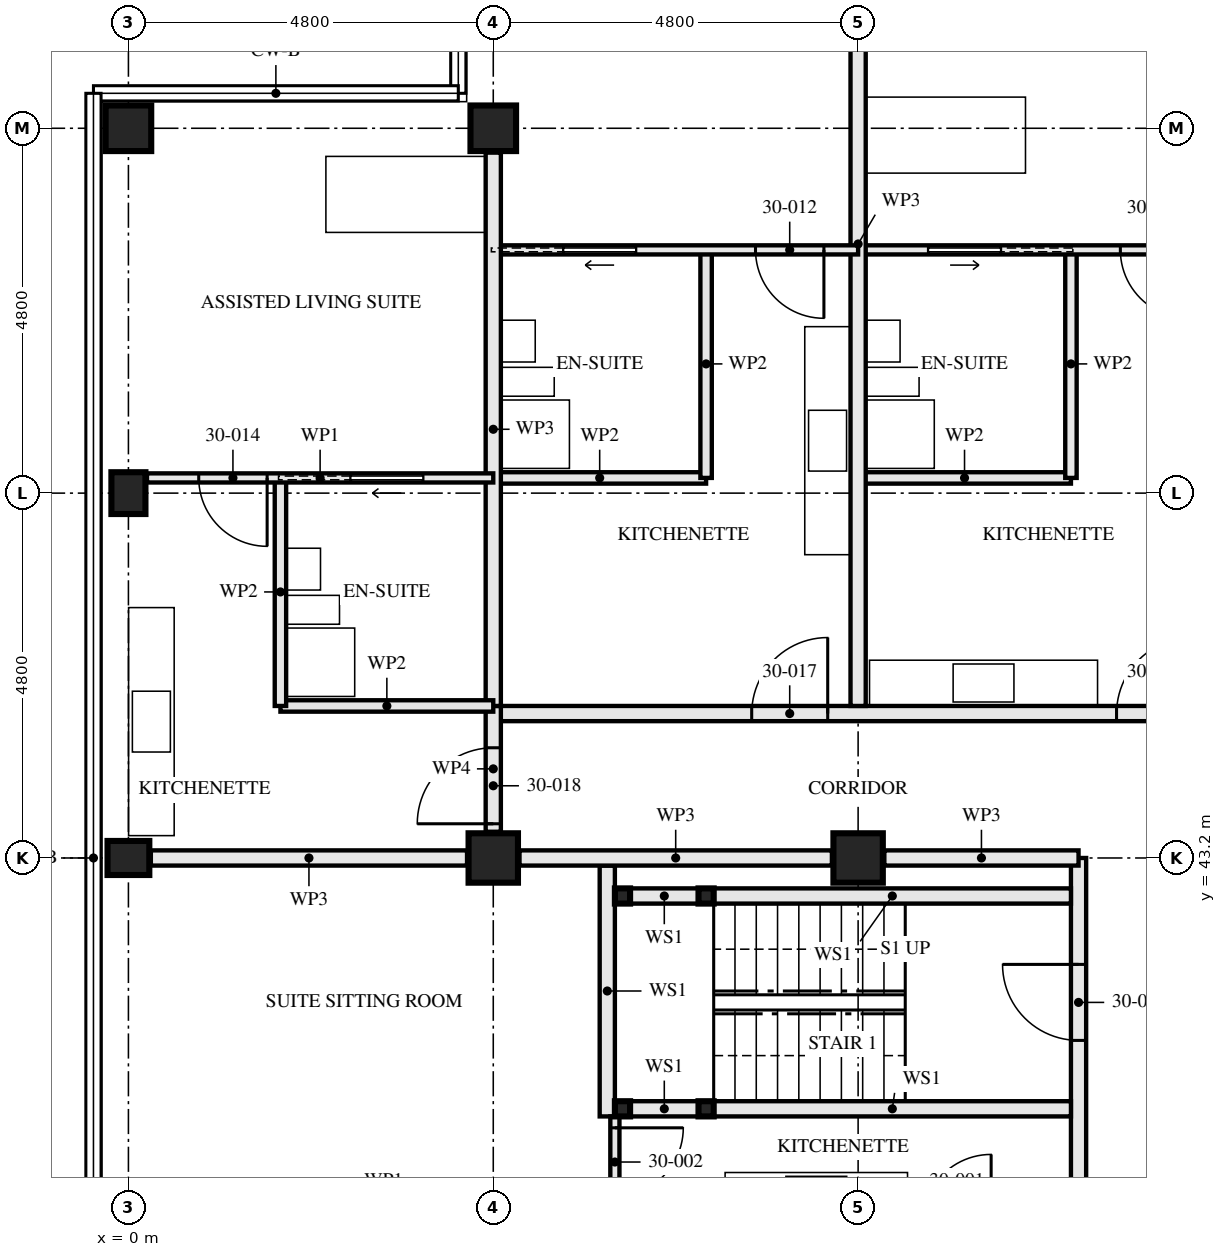
"""IFC4 building model, lengths in metres.
Left out: names, types, materials, properties, quantities, classifications, styles, units other than length and angle.
Written with IfcOpenShell. Run it as: python <this file> out.ifc"""

import sys

from ifc_helpers import new_model, si_unit, direction, frame, frame_2d, origin, origin_2d, place, context, subcontext, project, spatial, rectangle, hollow_rectangle, i_section, extrude, element, fill, save


model = new_model("IFC4")
c1 = context("Model", 3, precision=1e-05, world=origin(), true_north=direction((0.0, 1.0)))
c2 = subcontext(c1, "Body", "Model", "MODEL_VIEW")
j1 = project(units=[si_unit("LENGTHUNIT", "METRE"), si_unit("PLANEANGLEUNIT", "RADIAN")], contexts=[c1])
p1 = place(None, origin())
s1 = spatial("IfcSite", under=j1, at=p1, CompositionType="ELEMENT")
p2 = place(p1, origin())
s2 = spatial("IfcBuilding", under=s1, at=p2, CompositionType="ELEMENT")
p3 = place(p2, frame((0.0, 0.0, 112.0)))
s3 = spatial("IfcBuildingStorey", under=s2, at=p3, CompositionType="ELEMENT", Elevation=112.0)
for number, where, z_axis, x_axis in (
    (1, (0.0, 43.2, 0.0), (0.0, 0.0, 1.0), (0.0, 1.0, 0.0)),
    (2, (0.0, 48.0, 0.0), (0.0, 0.0, 1.0), (1.0, 0.0, 0.0)),
):
    element("IfcColumn", number, at=place(p3, frame(where, z_axis=z_axis, x_axis=x_axis)), inside=s3, PredefinedType="COLUMN", context=c2, shape_type="SweptSolid", body=[
        extrude(i_section(OverallWidth=0.448, OverallDepth=0.55, WebThickness=0.072, FlangeThickness=0.115, FilletRadius=0.015, at=origin_2d()), origin(), (0.0, 0.0, 1.0), 3.5),
    ])
p4 = place(p3, frame((0.0, 52.8, 0.0), z_axis=(0.0, 0.0, 1.0), x_axis=(0.0, 1.0, 0.0)))
e3 = element("IfcColumn", 3, at=p4, inside=s3, PredefinedType="COLUMN", context=c2, shape_type="SweptSolid", body=[
    extrude(hollow_rectangle(XDim=0.6, YDim=0.6, WallThickness=0.05, at=origin_2d()), origin(), (0.0, 0.0, 1.0), 3.5),
])
p5 = place(p3, frame((4.8, 43.2, 0.0), z_axis=(0.0, 0.0, 1.0), x_axis=(0.0, 1.0, 0.0)))
e4 = element("IfcColumn", 4, at=p5, inside=s3, PredefinedType="COLUMN", context=c2, shape_type="SweptSolid", body=[
    extrude(hollow_rectangle(XDim=0.65, YDim=0.65, WallThickness=0.05, at=origin_2d()), origin(), (0.0, 0.0, 1.0), 3.5),
])
p6 = place(p3, frame((4.8, 52.8, 0.0), z_axis=(0.0, 0.0, 1.0), x_axis=(0.0, 1.0, 0.0)))
e5 = element("IfcColumn", 5, at=p6, inside=s3, PredefinedType="COLUMN", context=c2, shape_type="SweptSolid", body=[
    extrude(hollow_rectangle(XDim=0.6, YDim=0.6, WallThickness=0.05, at=origin_2d()), origin(), (0.0, 0.0, 1.0), 3.5),
])
p7 = place(p3, frame((9.6, 43.2, 0.0), z_axis=(0.0, 0.0, 1.0), x_axis=(0.0, 1.0, 0.0)))
e6 = element("IfcColumn", 6, at=p7, inside=s3, PredefinedType="COLUMN", context=c2, shape_type="SweptSolid", body=[
    extrude(hollow_rectangle(XDim=0.65, YDim=0.65, WallThickness=0.05, at=origin_2d()), origin(), (0.0, 0.0, 1.0), 3.5),
])
for number, where, z_axis, x_axis in (
    (7, (6.5, 42.7, 0.0), (0.0, 0.0, 1.0), (1.0, 0.0, 0.0)),
    (8, (6.5, 39.9, 0.0), (0.0, 0.0, 1.0), (1.0, 0.0, 0.0)),
    (9, (7.6, 42.7, 0.0), (0.0, 0.0, 1.0), (1.0, 0.0, 0.0)),
    (10, (7.6, 39.9, 0.0), (0.0, 0.0, 1.0), (1.0, 0.0, 0.0)),
):
    element("IfcColumn", number, at=place(p3, frame(where, z_axis=z_axis, x_axis=x_axis)), inside=s3, PredefinedType="COLUMN", context=c2, shape_type="SweptSolid", body=[
        extrude(hollow_rectangle(XDim=0.2, YDim=0.2, WallThickness=0.008, at=origin_2d()), origin(), (0.0, 0.0, 1.0), 3.33),
    ])
p8 = place(p3, frame((6.6, 42.7, 0.0), z_axis=(0.0, 0.0, 1.0), x_axis=(1.0, 0.0, 0.0)))
e11 = element("IfcWall", 11, at=p8, inside=s3, PredefinedType="SOLIDWALL", context=c2, shape_type="SweptSolid", body=[
    extrude(rectangle(XDim=0.9, YDim=0.2, at=frame_2d((0.45, 0.0))), origin(), (0.0, 0.0, 1.0), 2.99),
])
p9 = place(p3, frame((7.7, 42.7, 0.0), z_axis=(0.0, 0.0, 1.0), x_axis=(1.0, 0.0, 0.0)))
e12 = element("IfcWall", 12, at=p9, inside=s3, PredefinedType="SOLIDWALL", context=c2, shape_type="SweptSolid", body=[
    extrude(rectangle(XDim=4.7, YDim=0.2, at=frame_2d((2.35, 0.0))), origin(), (0.0, 0.0, 1.0), 2.99),
])
p10 = place(p3, frame((6.6, 39.9, 0.0), z_axis=(0.0, 0.0, 1.0), x_axis=(1.0, 0.0, 0.0)))
e13 = element("IfcWall", 13, at=p10, inside=s3, PredefinedType="SOLIDWALL", context=c2, shape_type="SweptSolid", body=[
    extrude(rectangle(XDim=0.9, YDim=0.2, at=frame_2d((0.45, 0.0))), origin(), (0.0, 0.0, 1.0), 2.99),
])
p11 = place(p3, frame((7.7, 39.9, 0.0), z_axis=(0.0, 0.0, 1.0), x_axis=(1.0, 0.0, 0.0)))
e14 = element("IfcWall", 14, at=p11, inside=s3, PredefinedType="SOLIDWALL", context=c2, shape_type="SweptSolid", body=[
    extrude(rectangle(XDim=4.7, YDim=0.2, at=frame_2d((2.35, 0.0))), origin(), (0.0, 0.0, 1.0), 2.99),
])
p12 = place(p3, frame((6.3, 43.1, 0.0), z_axis=(0.0, 0.0, 1.0), x_axis=(0.0, -1.0, 0.0)))
e15 = element("IfcWall", 15, at=p12, inside=s3, PredefinedType="SOLIDWALL", context=c2, shape_type="SweptSolid", body=[
    extrude(rectangle(XDim=3.3, YDim=0.2, at=frame_2d((1.65, 0.0))), origin(), (0.0, 0.0, 1.0), 3.33),
])
p13 = place(p3, frame((6.4, 39.8, 0.0), z_axis=(0.0, 0.0, 1.0), x_axis=(0.0, -1.0, 0.0)))
e16 = element("IfcWall", 16, at=p13, inside=s3, PredefinedType="PARTITIONING", context=c2, shape_type="SweptSolid", body=[
    extrude(rectangle(XDim=1.4, YDim=0.12, at=frame_2d((0.7, 0.0))), origin(), (0.0, 0.0, 1.0), 3.33),
])
p14 = place(p13, frame((0.15, 0.0, 0.0)))
e17 = element("IfcOpeningElement", 17, at=p14, cuts=e16, PredefinedType="OPENING", context=c2, shape_type="SweptSolid", body=[
    extrude(rectangle(XDim=0.9, YDim=2.1, at=frame_2d((0.45, 1.05))), frame((0.0, 0.071, 0.0), z_axis=(0.0, -1.0, 0.0), x_axis=(1.0, 0.0, 0.0)), (0.0, 0.0, 1.0), 0.141),
])
p15 = place(p3, frame((12.5, 43.2, 0.0), z_axis=(0.0, 0.0, 1.0), x_axis=(0.0, -1.0, 0.0)))
e18 = element("IfcWall", 18, at=p15, inside=s3, PredefinedType="PARTITIONING", context=c2, shape_type="SweptSolid", body=[
    extrude(rectangle(XDim=14.84, YDim=0.2, at=frame_2d((7.42, 0.0))), origin(), (0.0, 0.0, 1.0), 2.32),
])
p16 = place(p15, frame((1.4, 0.0, 0.0)))
e19 = element("IfcOpeningElement", 19, at=p16, cuts=e18, PredefinedType="OPENING", context=c2, shape_type="SweptSolid", body=[
    extrude(rectangle(XDim=1.0, YDim=2.1, at=frame_2d((0.5, 1.05))), frame((0.0, 0.111, 0.0), z_axis=(0.0, -1.0, 0.0), x_axis=(1.0, 0.0, 0.0)), (0.0, 0.0, 1.0), 0.221),
])
p17 = place(p15, frame((5.2, 0.0, 0.0)))
e20 = element("IfcOpeningElement", 20, at=p17, cuts=e18, PredefinedType="OPENING", context=c2, shape_type="SweptSolid", body=[
    extrude(rectangle(XDim=1.0, YDim=2.1, at=frame_2d((0.5, 1.05))), frame((0.0, 0.111, 0.0), z_axis=(0.0, -1.0, 0.0), x_axis=(1.0, 0.0, 0.0)), (0.0, 0.0, 1.0), 0.221),
])
p18 = place(p15, frame((13.0, 0.0, 0.0)))
e21 = element("IfcOpeningElement", 21, at=p18, cuts=e18, PredefinedType="OPENING", context=c2, shape_type="SweptSolid", body=[
    extrude(rectangle(XDim=1.0, YDim=2.1, at=frame_2d((0.5, 1.05))), frame((0.0, 0.111, 0.0), z_axis=(0.0, -1.0, 0.0), x_axis=(1.0, 0.0, 0.0)), (0.0, 0.0, 1.0), 0.221),
])
p19 = place(p3, frame((12.4, 51.2, 0.0), z_axis=(0.0, 0.0, 1.0), x_axis=(0.0, -1.0, 0.0)))
e22 = element("IfcWall", 22, at=p19, inside=s3, PredefinedType="PARTITIONING", context=c2, shape_type="SweptSolid", body=[
    extrude(rectangle(XDim=3.0, YDim=0.15, at=frame_2d((1.5, 0.0))), origin(), (0.0, 0.0, 1.0), 3.33),
])
p20 = place(p3, frame((12.4, 48.2, 0.0), z_axis=(0.0, 0.0, 1.0), x_axis=(-1.0, 0.0, 0.0)))
e23 = element("IfcWall", 23, at=p20, inside=s3, PredefinedType="PARTITIONING", context=c2, shape_type="SweptSolid", body=[
    extrude(rectangle(XDim=2.8, YDim=0.15, at=frame_2d((1.4, 0.0))), origin(), (0.0, 0.0, 1.0), 3.33),
])
p21 = place(p3, frame((14.4, 51.2, 0.0), z_axis=(0.0, 0.0, 1.0), x_axis=(-1.0, 0.0, 0.0)))
e24 = element("IfcWall", 24, at=p21, inside=s3, PredefinedType="PARTITIONING", context=c2, shape_type="SweptSolid", body=[
    extrude(rectangle(XDim=4.8, YDim=0.12, at=frame_2d((2.4, 0.0))), origin(), (0.0, 0.0, 1.0), 3.33),
])
p22 = place(p21, frame((0.45, 0.0, 0.0)))
e25 = element("IfcOpeningElement", 25, at=p22, cuts=e24, PredefinedType="OPENING", context=c2, shape_type="SweptSolid", body=[
    extrude(rectangle(XDim=0.9, YDim=2.1, at=frame_2d((0.45, 1.05))), frame((0.0, 0.071, 0.0), z_axis=(0.0, -1.0, 0.0), x_axis=(1.0, 0.0, 0.0)), (0.0, 0.0, 1.0), 0.141),
])
p23 = place(p21, frame((2.925, 0.0, 0.0)))
e26 = element("IfcOpeningElement", 26, at=p23, cuts=e24, PredefinedType="OPENING", context=c2, shape_type="SweptSolid", body=[
    extrude(rectangle(XDim=0.95, YDim=2.1, at=frame_2d((0.475, 1.05))), frame((0.0, 0.071, 0.0), z_axis=(0.0, -1.0, 0.0), x_axis=(1.0, 0.0, 0.0)), (0.0, 0.0, 1.0), 0.141),
])
p24 = place(p3, frame((9.6, 57.356, 0.0), z_axis=(0.0, 0.0, 1.0), x_axis=(0.0, -1.0, 0.0)))
e27 = element("IfcWall", 27, at=p24, inside=s3, PredefinedType="PARTITIONING", context=c2, shape_type="SweptSolid", body=[
    extrude(rectangle(XDim=12.156, YDim=0.2, at=frame_2d((6.078, 0.0))), origin(), (0.0, 0.0, 1.0), 2.55),
])
p25 = place(p3, frame((7.6, 51.2, 0.0), z_axis=(0.0, 0.0, 1.0), x_axis=(0.0, -1.0, 0.0)))
e28 = element("IfcWall", 28, at=p25, inside=s3, PredefinedType="PARTITIONING", context=c2, shape_type="SweptSolid", body=[
    extrude(rectangle(XDim=3.0, YDim=0.15, at=frame_2d((1.5, 0.0))), origin(), (0.0, 0.0, 1.0), 3.33),
])
p26 = place(p3, frame((7.6, 48.2, 0.0), z_axis=(0.0, 0.0, 1.0), x_axis=(-1.0, 0.0, 0.0)))
e29 = element("IfcWall", 29, at=p26, inside=s3, PredefinedType="PARTITIONING", context=c2, shape_type="SweptSolid", body=[
    extrude(rectangle(XDim=2.8, YDim=0.15, at=frame_2d((1.4, 0.0))), origin(), (0.0, 0.0, 1.0), 3.33),
])
p27 = place(p3, frame((9.6, 51.2, 0.0), z_axis=(0.0, 0.0, 1.0), x_axis=(-1.0, 0.0, 0.0)))
e30 = element("IfcWall", 30, at=p27, inside=s3, PredefinedType="PARTITIONING", context=c2, shape_type="SweptSolid", body=[
    extrude(rectangle(XDim=4.8, YDim=0.12, at=frame_2d((2.4, 0.0))), origin(), (0.0, 0.0, 1.0), 3.33),
])
p28 = place(p27, frame((0.45, 0.0, 0.0)))
e31 = element("IfcOpeningElement", 31, at=p28, cuts=e30, PredefinedType="OPENING", context=c2, shape_type="SweptSolid", body=[
    extrude(rectangle(XDim=0.9, YDim=2.1, at=frame_2d((0.45, 1.05))), frame((0.0, 0.071, 0.0), z_axis=(0.0, -1.0, 0.0), x_axis=(1.0, 0.0, 0.0)), (0.0, 0.0, 1.0), 0.141),
])
p29 = place(p27, frame((2.925, 0.0, 0.0)))
e32 = element("IfcOpeningElement", 32, at=p29, cuts=e30, PredefinedType="OPENING", context=c2, shape_type="SweptSolid", body=[
    extrude(rectangle(XDim=0.95, YDim=2.1, at=frame_2d((0.475, 1.05))), frame((0.0, 0.071, 0.0), z_axis=(0.0, -1.0, 0.0), x_axis=(1.0, 0.0, 0.0)), (0.0, 0.0, 1.0), 0.141),
])
p30 = place(p3, frame((4.8, 52.48, 0.0), z_axis=(0.0, 0.0, 1.0), x_axis=(0.0, -1.0, 0.0)))
e33 = element("IfcWall", 33, at=p30, inside=s3, PredefinedType="PARTITIONING", context=c2, shape_type="SweptSolid", body=[
    extrude(rectangle(XDim=7.28, YDim=0.2, at=frame_2d((3.64, 0.0))), origin(), (0.0, 0.0, 1.0), 2.55),
])
p31 = place(p3, frame((2.0, 48.2, 0.0), z_axis=(0.0, 0.0, 1.0), x_axis=(0.0, -1.0, 0.0)))
e34 = element("IfcWall", 34, at=p31, inside=s3, PredefinedType="PARTITIONING", context=c2, shape_type="SweptSolid", body=[
    extrude(rectangle(XDim=3.0, YDim=0.15, at=frame_2d((1.5, 0.0))), origin(), (0.0, 0.0, 1.0), 2.55),
])
p32 = place(p3, frame((4.8, 45.2, 0.0), z_axis=(0.0, 0.0, 1.0), x_axis=(-1.0, 0.0, 0.0)))
e35 = element("IfcWall", 35, at=p32, inside=s3, PredefinedType="PARTITIONING", context=c2, shape_type="SweptSolid", body=[
    extrude(rectangle(XDim=2.8, YDim=0.15, at=frame_2d((1.4, 0.0))), origin(), (0.0, 0.0, 1.0), 3.33),
])
p33 = place(p3, frame((4.8, 48.2, 0.0), z_axis=(0.0, 0.0, 1.0), x_axis=(-1.0, 0.0, 0.0)))
e36 = element("IfcWall", 36, at=p33, inside=s3, PredefinedType="PARTITIONING", context=c2, shape_type="SweptSolid", body=[
    extrude(rectangle(XDim=4.556, YDim=0.12, at=frame_2d((2.278, 0.0))), origin(), (0.0, 0.0, 1.0), 3.33),
])
p34 = place(p33, frame((2.975, 0.0, 0.0)))
e37 = element("IfcOpeningElement", 37, at=p34, cuts=e36, PredefinedType="OPENING", context=c2, shape_type="SweptSolid", body=[
    extrude(rectangle(XDim=0.9, YDim=2.1, at=frame_2d((0.45, 1.05))), frame((0.0, 0.071, 0.0), z_axis=(0.0, -1.0, 0.0), x_axis=(1.0, 0.0, 0.0)), (0.0, 0.0, 1.0), 0.141),
])
p35 = place(p33, frame((0.925, 0.0, 0.0)))
e38 = element("IfcOpeningElement", 38, at=p35, cuts=e36, PredefinedType="OPENING", context=c2, shape_type="SweptSolid", body=[
    extrude(rectangle(XDim=0.95, YDim=2.1, at=frame_2d((0.475, 1.05))), frame((0.0, 0.071, 0.0), z_axis=(0.0, -1.0, 0.0), x_axis=(1.0, 0.0, 0.0)), (0.0, 0.0, 1.0), 0.141),
])
p36 = place(p3, frame((14.4, 45.1, 0.0), z_axis=(0.0, 0.0, 1.0), x_axis=(-1.0, 0.0, 0.0)))
e39 = element("IfcWall", 39, at=p36, inside=s3, PredefinedType="PARTITIONING", context=c2, shape_type="SweptSolid", body=[
    extrude(rectangle(XDim=9.6, YDim=0.2, at=frame_2d((4.8, 0.0))), origin(), (0.0, 0.0, 1.0), 3.33),
])
p37 = place(p36, frame((0.4, 0.0, 0.0)))
e40 = element("IfcOpeningElement", 40, at=p37, cuts=e39, PredefinedType="OPENING", context=c2, shape_type="SweptSolid", body=[
    extrude(rectangle(XDim=1.0, YDim=2.1, at=frame_2d((0.5, 1.05))), frame((0.0, 0.111, 0.0), z_axis=(0.0, -1.0, 0.0), x_axis=(1.0, 0.0, 0.0)), (0.0, 0.0, 1.0), 0.221),
])
p38 = place(p36, frame((5.2, 0.0, 0.0)))
e41 = element("IfcOpeningElement", 41, at=p38, cuts=e39, PredefinedType="OPENING", context=c2, shape_type="SweptSolid", body=[
    extrude(rectangle(XDim=1.0, YDim=2.1, at=frame_2d((0.5, 1.05))), frame((0.0, 0.111, 0.0), z_axis=(0.0, -1.0, 0.0), x_axis=(1.0, 0.0, 0.0)), (0.0, 0.0, 1.0), 0.221),
])
p39 = place(p3, frame((4.8, 45.2, 0.0), z_axis=(0.0, 0.0, 1.0), x_axis=(0.0, -1.0, 0.0)))
e42 = element("IfcWall", 42, at=p39, inside=s3, PredefinedType="PARTITIONING", context=c2, shape_type="SweptSolid", body=[
    extrude(rectangle(XDim=1.655, YDim=0.2, at=frame_2d((0.828, 0.0))), origin(), (0.0, 0.0, 1.0), 3.33),
])
p40 = place(p39, frame((0.55, 0.0, 0.0)))
e43 = element("IfcOpeningElement", 43, at=p40, cuts=e42, PredefinedType="OPENING", context=c2, shape_type="SweptSolid", body=[
    extrude(rectangle(XDim=1.0, YDim=2.1, at=frame_2d((0.5, 1.05))), frame((0.0, 0.111, 0.0), z_axis=(0.0, -1.0, 0.0), x_axis=(1.0, 0.0, 0.0)), (0.0, 0.0, 1.0), 0.221),
])
p41 = place(p3, frame((12.5, 43.2, 0.0), z_axis=(0.0, 0.0, 1.0), x_axis=(-1.0, 0.0, 0.0)))
e44 = element("IfcWall", 44, at=p41, inside=s3, PredefinedType="PARTITIONING", context=c2, shape_type="SweptSolid", body=[
    extrude(rectangle(XDim=2.555, YDim=0.2, at=frame_2d((1.277, 0.0))), origin(), (0.0, 0.0, 1.0), 2.32),
])
p42 = place(p3, frame((9.255, 43.2, 0.0), z_axis=(0.0, 0.0, 1.0), x_axis=(-1.0, 0.0, 0.0)))
e45 = element("IfcWall", 45, at=p42, inside=s3, PredefinedType="PARTITIONING", context=c2, shape_type="SweptSolid", body=[
    extrude(rectangle(XDim=4.11, YDim=0.2, at=frame_2d((2.055, 0.0))), origin(), (0.0, 0.0, 1.0), 2.32),
])
p43 = place(p3, frame((4.455, 43.2, 0.0), z_axis=(0.0, 0.0, 1.0), x_axis=(-1.0, 0.0, 0.0)))
e46 = element("IfcWall", 46, at=p43, inside=s3, PredefinedType="PARTITIONING", context=c2, shape_type="SweptSolid", body=[
    extrude(rectangle(XDim=4.16, YDim=0.2, at=frame_2d((2.08, 0.0))), origin(), (0.0, 0.0, 1.0), 2.32),
])
p44 = place(p14, origin())
e47 = element("IfcDoor", 47, at=p44, inside=s3, OperationType="SINGLE_SWING_RIGHT", PredefinedType="DOOR", context=c2, shape_type="SweptSolid", body=[
    extrude(rectangle(XDim=0.9, YDim=2.1, at=frame_2d((0.45, 1.05))), frame((0.0, 0.022, 0.0), z_axis=(0.0, -1.0, 0.0), x_axis=(1.0, 0.0, 0.0)), (0.0, 0.0, 1.0), 0.044),
])
fill(e17, e47)
p45 = place(p16, frame((1.0, 0.0, 0.0), z_axis=(0.0, 0.0, 1.0), x_axis=(-1.0, 0.0, 0.0)))
e48 = element("IfcDoor", 48, at=p45, inside=s3, OperationType="SINGLE_SWING_LEFT", PredefinedType="DOOR", context=c2, shape_type="SweptSolid", body=[
    extrude(rectangle(XDim=1.0, YDim=2.1, at=frame_2d((0.5, 1.05))), frame((0.0, 0.032, 0.0), z_axis=(0.0, -1.0, 0.0), x_axis=(1.0, 0.0, 0.0)), (0.0, 0.0, 1.0), 0.064),
])
fill(e19, e48)
p46 = place(p22, origin())
e49 = element("IfcDoor", 49, at=p46, inside=s3, OperationType="SINGLE_SWING_RIGHT", PredefinedType="DOOR", context=c2, shape_type="SweptSolid", body=[
    extrude(rectangle(XDim=0.9, YDim=2.1, at=frame_2d((0.45, 1.05))), frame((0.0, 0.022, 0.0), z_axis=(0.0, -1.0, 0.0), x_axis=(1.0, 0.0, 0.0)), (0.0, 0.0, 1.0), 0.044),
])
fill(e25, e49)
p47 = place(p23, origin())
e50 = element("IfcDoor", 50, at=p47, inside=s3, OperationType="SLIDING_TO_RIGHT", PredefinedType="DOOR", context=c2, shape_type="SweptSolid", body=[
    extrude(rectangle(XDim=0.95, YDim=2.1, at=frame_2d((0.475, 1.05))), frame((0.0, 0.022, 0.0), z_axis=(0.0, -1.0, 0.0), x_axis=(1.0, 0.0, 0.0)), (0.0, 0.0, 1.0), 0.044),
])
fill(e26, e50)
p48 = place(p28, origin())
e51 = element("IfcDoor", 51, at=p48, inside=s3, OperationType="SINGLE_SWING_RIGHT", PredefinedType="DOOR", context=c2, shape_type="SweptSolid", body=[
    extrude(rectangle(XDim=0.9, YDim=2.1, at=frame_2d((0.45, 1.05))), frame((0.0, 0.022, 0.0), z_axis=(0.0, -1.0, 0.0), x_axis=(1.0, 0.0, 0.0)), (0.0, 0.0, 1.0), 0.044),
])
fill(e31, e51)
p49 = place(p29, origin())
e52 = element("IfcDoor", 52, at=p49, inside=s3, OperationType="SLIDING_TO_LEFT", PredefinedType="DOOR", context=c2, shape_type="SweptSolid", body=[
    extrude(rectangle(XDim=0.95, YDim=2.1, at=frame_2d((0.475, 1.05))), frame((0.0, 0.022, 0.0), z_axis=(0.0, -1.0, 0.0), x_axis=(1.0, 0.0, 0.0)), (0.0, 0.0, 1.0), 0.044),
])
fill(e32, e52)
p50 = place(p34, origin())
e53 = element("IfcDoor", 53, at=p50, inside=s3, OperationType="SINGLE_SWING_RIGHT", PredefinedType="DOOR", context=c2, shape_type="SweptSolid", body=[
    extrude(rectangle(XDim=0.9, YDim=2.1, at=frame_2d((0.45, 1.05))), frame((0.0, 0.022, 0.0), z_axis=(0.0, -1.0, 0.0), x_axis=(1.0, 0.0, 0.0)), (0.0, 0.0, 1.0), 0.044),
])
fill(e37, e53)
p51 = place(p35, origin())
e54 = element("IfcDoor", 54, at=p51, inside=s3, OperationType="SLIDING_TO_LEFT", PredefinedType="DOOR", context=c2, shape_type="SweptSolid", body=[
    extrude(rectangle(XDim=0.95, YDim=2.1, at=frame_2d((0.475, 1.05))), frame((0.0, 0.022, 0.0), z_axis=(0.0, -1.0, 0.0), x_axis=(1.0, 0.0, 0.0)), (0.0, 0.0, 1.0), 0.044),
])
fill(e38, e54)
p52 = place(p37, frame((1.0, 0.0, 0.0), z_axis=(0.0, 0.0, 1.0), x_axis=(-1.0, 0.0, 0.0)))
e55 = element("IfcDoor", 55, at=p52, inside=s3, OperationType="SINGLE_SWING_LEFT", PredefinedType="DOOR", context=c2, shape_type="SweptSolid", body=[
    extrude(rectangle(XDim=1.0, YDim=2.1, at=frame_2d((0.5, 1.05))), frame((0.0, 0.027, 0.0), z_axis=(0.0, -1.0, 0.0), x_axis=(1.0, 0.0, 0.0)), (0.0, 0.0, 1.0), 0.054),
])
fill(e40, e55)
p53 = place(p38, frame((1.0, 0.0, 0.0), z_axis=(0.0, 0.0, 1.0), x_axis=(-1.0, 0.0, 0.0)))
e56 = element("IfcDoor", 56, at=p53, inside=s3, OperationType="SINGLE_SWING_LEFT", PredefinedType="DOOR", context=c2, shape_type="SweptSolid", body=[
    extrude(rectangle(XDim=1.0, YDim=2.1, at=frame_2d((0.5, 1.05))), frame((0.0, 0.027, 0.0), z_axis=(0.0, -1.0, 0.0), x_axis=(1.0, 0.0, 0.0)), (0.0, 0.0, 1.0), 0.054),
])
fill(e41, e56)
p54 = place(p40, frame((1.0, 0.0, 0.0), z_axis=(0.0, 0.0, 1.0), x_axis=(-1.0, 0.0, 0.0)))
e57 = element("IfcDoor", 57, at=p54, inside=s3, OperationType="SINGLE_SWING_RIGHT", PredefinedType="DOOR", context=c2, shape_type="SweptSolid", body=[
    extrude(rectangle(XDim=1.0, YDim=2.1, at=frame_2d((0.5, 1.05))), frame((0.0, 0.027, 0.0), z_axis=(0.0, -1.0, 0.0), x_axis=(1.0, 0.0, 0.0)), (0.0, 0.0, 1.0), 0.054),
])
fill(e43, e57)
save(model, sys.argv[1])
